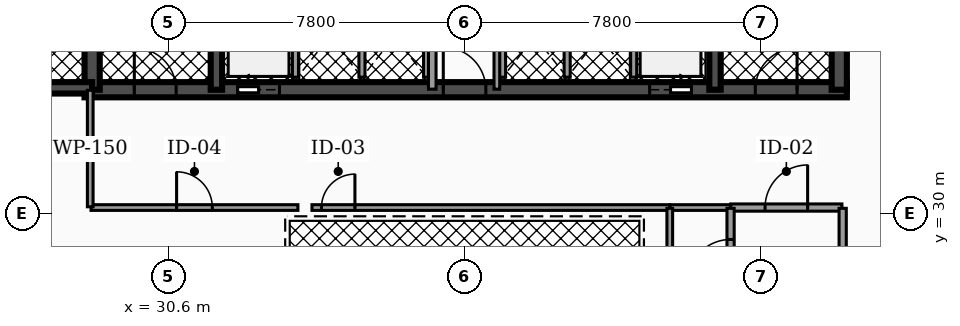
"""IFC4 building model, lengths in metres.
Left out: names, types, materials, properties, quantities, classifications, styles, units other than length and angle.
Written with IfcOpenShell. Run it as: python <this file> out.ifc"""

import sys

from ifc_helpers import new_model, si_unit, direction, frame, frame_2d, origin, place, context, subcontext, project, spatial, rectangle, extrude, element, fill, save


model = new_model("IFC4")
c1 = context("Model", 3, precision=1e-05, world=origin(), true_north=direction((0.0, 1.0)))
c2 = subcontext(c1, "Body", "Model", "MODEL_VIEW")
j1 = project(units=[si_unit("LENGTHUNIT", "METRE"), si_unit("PLANEANGLEUNIT", "RADIAN")], contexts=[c1])
p1 = place(None, origin())
s1 = spatial("IfcSite", under=j1, at=p1, CompositionType="ELEMENT")
p2 = place(p1, origin())
s2 = spatial("IfcBuilding", under=s1, at=p2, CompositionType="ELEMENT")
p3 = place(p2, frame((0.0, 0.0, 88.74)))
s3 = spatial("IfcBuildingStorey", under=s2, at=p3, CompositionType="ELEMENT", Elevation=88.74)
p4 = place(p3, frame((28.4, 33.25, 0.0), z_axis=(0.0, 0.0, 1.0), x_axis=(1.0, 0.0, 0.0)))
e1 = element("IfcWall", 1, at=p4, inside=s3, PredefinedType="SHEAR", context=c2, shape_type="SweptSolid", body=[
    extrude(rectangle(XDim=20.06, YDim=0.4, at=frame_2d((10.03, 0.0))), origin(), (0.0, 0.0, 1.0), 3.82),
])
p5 = place(p4, frame((4.03, 0.0, 0.0)))
e2 = element("IfcOpeningElement", 2, at=p5, cuts=e1, PredefinedType="OPENING", context=c2, shape_type="SweptSolid", body=[
    extrude(rectangle(XDim=1.1, YDim=2.15, at=frame_2d((0.55, 1.075))), frame((0.0, 0.21, 0.0), z_axis=(0.0, -1.0, 0.0), x_axis=(1.0, 0.0, 0.0)), (0.0, 0.0, 1.0), 0.42),
])
p6 = place(p4, frame((14.87, 0.0, 0.0)))
e3 = element("IfcOpeningElement", 3, at=p6, cuts=e1, PredefinedType="OPENING", context=c2, shape_type="SweptSolid", body=[
    extrude(rectangle(XDim=1.1, YDim=2.15, at=frame_2d((0.55, 1.075))), frame((0.0, 0.21, 0.0), z_axis=(0.0, -1.0, 0.0), x_axis=(1.0, 0.0, 0.0)), (0.0, 0.0, 1.0), 0.42),
])
p7 = place(p4, frame((1.31, 0.0, 0.0)))
e4 = element("IfcOpeningElement", 4, at=p7, cuts=e1, PredefinedType="OPENING", context=c2, shape_type="SweptSolid", body=[
    extrude(rectangle(XDim=1.1, YDim=2.2, at=frame_2d((0.55, 1.1))), frame((0.0, 0.21, 0.0), z_axis=(0.0, -1.0, 0.0), x_axis=(1.0, 0.0, 0.0)), (0.0, 0.0, 1.0), 0.42),
])
p8 = place(p4, frame((9.44, 0.0, 0.0)))
e5 = element("IfcOpeningElement", 5, at=p8, cuts=e1, PredefinedType="OPENING", context=c2, shape_type="SweptSolid", body=[
    extrude(rectangle(XDim=1.12, YDim=2.05, at=frame_2d((0.56, 1.025))), frame((0.0, 0.21, 0.0), z_axis=(0.0, -1.0, 0.0), x_axis=(1.0, 0.0, 0.0)), (0.0, 0.0, 1.0), 0.42),
])
p9 = place(p4, frame((17.65, 0.0, 0.0)))
e6 = element("IfcOpeningElement", 6, at=p9, cuts=e1, PredefinedType="OPENING", context=c2, shape_type="SweptSolid", body=[
    extrude(rectangle(XDim=1.1, YDim=2.2, at=frame_2d((0.55, 1.1))), frame((0.0, 0.21, 0.0), z_axis=(0.0, -1.0, 0.0), x_axis=(1.0, 0.0, 0.0)), (0.0, 0.0, 1.0), 0.42),
])
p10 = place(p3, frame((28.6, 33.25, 0.0), z_axis=(0.0, 0.0, 1.0), x_axis=(0.0, 1.0, 0.0)))
e7 = element("IfcWall", 7, at=p10, inside=s3, PredefinedType="SHEAR", context=c2, shape_type="SweptSolid", body=[
    extrude(rectangle(XDim=10.2, YDim=0.4, at=frame_2d((5.1, 0.0))), origin(), (0.0, 0.0, 1.0), 3.82),
])
for number, where, z_axis, x_axis in (
    (8, (31.87, 33.25, 0.0), (0.0, 0.0, 1.0), (0.0, 1.0, 0.0)),
    (9, (44.99, 33.25, 0.0), (0.0, 0.0, 1.0), (0.0, 1.0, 0.0)),
):
    element("IfcWall", number, at=place(p3, frame(where, z_axis=z_axis, x_axis=x_axis)), inside=s3, PredefinedType="SHEAR", context=c2, shape_type="SweptSolid", body=[
        extrude(rectangle(XDim=10.2, YDim=0.3, at=frame_2d((5.1, 0.0))), origin(), (0.0, 0.0, 1.0), 3.82),
    ])
p11 = place(p3, frame((48.26, 33.25, 0.0), z_axis=(0.0, 0.0, 1.0), x_axis=(0.0, 1.0, 0.0)))
e10 = element("IfcWall", 10, at=p11, inside=s3, PredefinedType="SHEAR", context=c2, shape_type="SweptSolid", body=[
    extrude(rectangle(XDim=10.2, YDim=0.4, at=frame_2d((5.1, 0.0))), origin(), (0.0, 0.0, 1.0), 3.82),
])
p12 = place(p3, frame((25.08, 33.3, 0.0), z_axis=(0.0, 0.0, 1.0), x_axis=(1.0, 0.0, 0.0)))
e11 = element("IfcWall", 11, at=p12, inside=s3, PredefinedType="SHEAR", context=c2, shape_type="SweptSolid", body=[
    extrude(rectangle(XDim=3.52, YDim=0.3, at=frame_2d((1.76, 0.0))), origin(), (0.0, 0.0, 1.0), 3.82),
])
p13 = place(p12, frame((1.335, 0.0, 0.0)))
e12 = element("IfcOpeningElement", 12, at=p13, cuts=e11, PredefinedType="OPENING", context=c2, shape_type="SweptSolid", body=[
    extrude(rectangle(XDim=0.95, YDim=2.2, at=frame_2d((0.475, 1.1))), frame((0.0, 0.16, 0.0), z_axis=(0.0, -1.0, 0.0), x_axis=(1.0, 0.0, 0.0)), (0.0, 0.0, 1.0), 0.32),
])
for number, where, z_axis, x_axis in (
    (13, (33.95, 33.58, 0.0), (0.0, 0.0, 1.0), (0.0, 1.0, 0.0)),
    (14, (42.85, 33.58, 0.0), (0.0, 0.0, 1.0), (0.0, 1.0, 0.0)),
):
    element("IfcWall", number, at=place(p3, frame(where, z_axis=z_axis, x_axis=x_axis)), inside=s3, PredefinedType="SOLIDWALL", context=c2, shape_type="SweptSolid", body=[
        extrude(rectangle(XDim=2.45, YDim=0.16, at=frame_2d((1.225, 0.0))), origin(), (0.0, 0.0, 1.0), 2.792),
    ])
for number, where, z_axis, x_axis in (
    (15, (35.7, 33.58, 0.0), (0.0, 0.0, 1.0), (0.0, 1.0, 0.0)),
    (16, (37.4, 33.58, 0.0), (0.0, 0.0, 1.0), (0.0, 1.0, 0.0)),
    (17, (39.4, 33.58, 0.0), (0.0, 0.0, 1.0), (0.0, 1.0, 0.0)),
    (18, (41.1, 33.58, 0.0), (0.0, 0.0, 1.0), (0.0, 1.0, 0.0)),
):
    element("IfcWall", number, at=place(p3, frame(where, z_axis=z_axis, x_axis=x_axis)), inside=s3, PredefinedType="SOLIDWALL", context=c2, shape_type="SweptSolid", body=[
        extrude(rectangle(XDim=2.25, YDim=0.16, at=frame_2d((1.125, 0.0))), origin(), (0.0, 0.0, 1.0), 2.792),
    ])
p14 = place(p3, frame((37.55, 33.265, 0.0), z_axis=(0.0, 0.0, 1.0), x_axis=(0.0, 1.0, 0.0)))
e19 = element("IfcWall", 19, at=p14, inside=s3, PredefinedType="PARTITIONING", context=c2, shape_type="SweptSolid", body=[
    extrude(rectangle(XDim=4.595, YDim=0.2, at=frame_2d((2.298, 0.0))), origin(), (0.0, 0.0, 1.0), 2.777),
])
p15 = place(p14, frame((3.058, 0.0, 0.0)))
e20 = element("IfcOpeningElement", 20, at=p15, cuts=e19, PredefinedType="OPENING", context=c2, shape_type="SweptSolid", body=[
    extrude(rectangle(XDim=0.88, YDim=2.05, at=frame_2d((0.44, 1.025))), frame((0.0, 0.11, 0.0), z_axis=(0.0, -1.0, 0.0), x_axis=(1.0, 0.0, 0.0)), (0.0, 0.0, 1.0), 0.22),
])
p16 = place(p3, frame((39.25, 33.265, 0.0), z_axis=(0.0, 0.0, 1.0), x_axis=(0.0, 1.0, 0.0)))
e21 = element("IfcWall", 21, at=p16, inside=s3, PredefinedType="PARTITIONING", context=c2, shape_type="SweptSolid", body=[
    extrude(rectangle(XDim=4.595, YDim=0.15, at=frame_2d((2.298, 0.0))), origin(), (0.0, 0.0, 1.0), 2.777),
])
p17 = place(p16, frame((3.028, 0.0, 0.0)))
e22 = element("IfcOpeningElement", 22, at=p17, cuts=e21, PredefinedType="OPENING", context=c2, shape_type="SweptSolid", body=[
    extrude(rectangle(XDim=0.94, YDim=2.05, at=frame_2d((0.47, 1.025))), frame((0.0, 0.085, 0.0), z_axis=(0.0, -1.0, 0.0), x_axis=(1.0, 0.0, 0.0)), (0.0, 0.0, 1.0), 0.17),
])
p18 = place(p3, frame((45.405, 30.15, 0.0), z_axis=(0.0, 0.0, 1.0), x_axis=(1.0, 0.0, 0.0)))
e23 = element("IfcWall", 23, at=p18, inside=s3, PredefinedType="PARTITIONING", context=c2, shape_type="SweptSolid", body=[
    extrude(rectangle(XDim=2.925, YDim=0.19, at=frame_2d((1.462, 0.0))), origin(), (0.0, 0.0, 1.0), 2.777),
])
p19 = place(p18, frame((0.903, 0.0, 0.0)))
e24 = element("IfcOpeningElement", 24, at=p19, cuts=e23, PredefinedType="OPENING", context=c2, shape_type="SweptSolid", body=[
    extrude(rectangle(XDim=1.12, YDim=2.05, at=frame_2d((0.56, 1.025))), frame((0.0, 0.105, 0.0), z_axis=(0.0, -1.0, 0.0), x_axis=(1.0, 0.0, 0.0)), (0.0, 0.0, 1.0), 0.21),
])
p20 = place(p3, frame((43.805, 30.15, 0.0), z_axis=(0.0, 0.0, 1.0), x_axis=(1.0, 0.0, 0.0)))
e25 = element("IfcWall", 25, at=p20, inside=s3, PredefinedType="PARTITIONING", context=c2, shape_type="SweptSolid", body=[
    extrude(rectangle(XDim=1.59, YDim=0.15, at=frame_2d((0.795, 0.0))), origin(), (0.0, 0.0, 1.0), 2.777),
])
p21 = place(p3, frame((28.57, 30.15, 0.0), z_axis=(0.0, 0.0, 1.0), x_axis=(1.0, 0.0, 0.0)))
e26 = element("IfcWall", 26, at=p21, inside=s3, PredefinedType="PARTITIONING", context=c2, shape_type="SweptSolid", body=[
    extrude(rectangle(XDim=5.445, YDim=0.15, at=frame_2d((2.722, 0.0))), origin(), (0.0, 0.0, 1.0), 2.777),
])
p22 = place(p21, frame((2.252, 0.0, 0.0)))
e27 = element("IfcOpeningElement", 27, at=p22, cuts=e26, PredefinedType="OPENING", context=c2, shape_type="SweptSolid", body=[
    extrude(rectangle(XDim=0.94, YDim=2.05, at=frame_2d((0.47, 1.025))), frame((0.0, 0.085, 0.0), z_axis=(0.0, -1.0, 0.0), x_axis=(1.0, 0.0, 0.0)), (0.0, 0.0, 1.0), 0.17),
])
p23 = place(p3, frame((28.55, 30.17, 0.0), z_axis=(0.0, 0.0, 1.0), x_axis=(0.0, 1.0, 0.0)))
e28 = element("IfcWall", 28, at=p23, inside=s3, PredefinedType="PARTITIONING", context=c2, shape_type="SweptSolid", body=[
    extrude(rectangle(XDim=3.065, YDim=0.15, at=frame_2d((1.533, 0.0))), origin(), (0.0, 0.0, 1.0), 2.777),
])
p24 = place(p3, frame((34.385, 30.15, 0.0), z_axis=(0.0, 0.0, 1.0), x_axis=(1.0, 0.0, 0.0)))
e29 = element("IfcWall", 29, at=p24, inside=s3, PredefinedType="PARTITIONING", context=c2, shape_type="SweptSolid", body=[
    extrude(rectangle(XDim=9.41, YDim=0.15, at=frame_2d((4.705, 0.0))), origin(), (0.0, 0.0, 1.0), 2.777),
])
p25 = place(p24, frame((0.25, 0.0, 0.0)))
e30 = element("IfcOpeningElement", 30, at=p25, cuts=e29, PredefinedType="OPENING", context=c2, shape_type="SweptSolid", body=[
    extrude(rectangle(XDim=0.88, YDim=2.05, at=frame_2d((0.44, 1.025))), frame((0.0, 0.085, 0.0), z_axis=(0.0, -1.0, 0.0), x_axis=(1.0, 0.0, 0.0)), (0.0, 0.0, 1.0), 0.17),
])
p26 = place(p3, frame((45.4, 27.37, 0.0), z_axis=(0.0, 0.0, 1.0), x_axis=(0.0, 1.0, 0.0)))
e31 = element("IfcWall", 31, at=p26, inside=s3, PredefinedType="PARTITIONING", context=c2, shape_type="SweptSolid", body=[
    extrude(rectangle(XDim=2.76, YDim=0.19, at=frame_2d((1.38, 0.0))), origin(), (0.0, 0.0, 1.0), 2.777),
])
p27 = place(p26, frame((0.82, 0.0, 0.0)))
e32 = element("IfcOpeningElement", 32, at=p27, cuts=e31, PredefinedType="OPENING", context=c2, shape_type="SweptSolid", body=[
    extrude(rectangle(XDim=1.12, YDim=2.05, at=frame_2d((0.56, 1.025))), frame((0.0, 0.105, 0.0), z_axis=(0.0, -1.0, 0.0), x_axis=(1.0, 0.0, 0.0)), (0.0, 0.0, 1.0), 0.21),
])
p28 = place(p3, frame((48.35, 27.37, 0.0), z_axis=(0.0, 0.0, 1.0), x_axis=(0.0, 1.0, 0.0)))
e33 = element("IfcWall", 33, at=p28, inside=s3, PredefinedType="PARTITIONING", context=c2, shape_type="SweptSolid", body=[
    extrude(rectangle(XDim=2.76, YDim=0.19, at=frame_2d((1.38, 0.0))), origin(), (0.0, 0.0, 1.0), 2.777),
])
p29 = place(p3, frame((43.8, 23.62, 0.0), z_axis=(0.0, 0.0, 1.0), x_axis=(0.0, 1.0, 0.0)))
e34 = element("IfcWall", 34, at=p29, inside=s3, PredefinedType="PARTITIONING", context=c2, shape_type="SweptSolid", body=[
    extrude(rectangle(XDim=6.51, YDim=0.15, at=frame_2d((3.255, 0.0))), origin(), (0.0, 0.0, 1.0), 2.777),
])
p30 = place(p5, origin())
e35 = element("IfcDoor", 35, at=p30, inside=s3, OperationType="SLIDING_TO_LEFT", PredefinedType="DOOR", context=c2, shape_type="SweptSolid", body=[
    extrude(rectangle(XDim=1.1, YDim=2.15, at=frame_2d((0.55, 1.075))), frame((0.0, 0.025, 0.0), z_axis=(0.0, -1.0, 0.0), x_axis=(1.0, 0.0, 0.0)), (0.0, 0.0, 1.0), 0.05),
])
fill(e2, e35)
p31 = place(p6, origin())
e36 = element("IfcDoor", 36, at=p31, inside=s3, OperationType="SLIDING_TO_RIGHT", PredefinedType="DOOR", context=c2, shape_type="SweptSolid", body=[
    extrude(rectangle(XDim=1.1, YDim=2.15, at=frame_2d((0.55, 1.075))), frame((0.0, 0.025, 0.0), z_axis=(0.0, -1.0, 0.0), x_axis=(1.0, 0.0, 0.0)), (0.0, 0.0, 1.0), 0.05),
])
fill(e3, e36)
p32 = place(p7, origin())
e37 = element("IfcDoor", 37, at=p32, inside=s3, OperationType="SINGLE_SWING_LEFT", PredefinedType="DOOR", context=c2, shape_type="SweptSolid", body=[
    extrude(rectangle(XDim=1.1, YDim=2.2, at=frame_2d((0.55, 1.1))), frame((0.0, 0.025, 0.0), z_axis=(0.0, -1.0, 0.0), x_axis=(1.0, 0.0, 0.0)), (0.0, 0.0, 1.0), 0.05),
])
fill(e4, e37)
p33 = place(p8, origin())
e38 = element("IfcDoor", 38, at=p33, inside=s3, OperationType="SINGLE_SWING_LEFT", PredefinedType="DOOR", context=c2, shape_type="SweptSolid", body=[
    extrude(rectangle(XDim=1.12, YDim=2.05, at=frame_2d((0.56, 1.025))), frame((0.0, 0.025, 0.0), z_axis=(0.0, -1.0, 0.0), x_axis=(1.0, 0.0, 0.0)), (0.0, 0.0, 1.0), 0.05),
])
fill(e5, e38)
p34 = place(p9, origin())
e39 = element("IfcDoor", 39, at=p34, inside=s3, OperationType="SINGLE_SWING_RIGHT", PredefinedType="DOOR", context=c2, shape_type="SweptSolid", body=[
    extrude(rectangle(XDim=1.1, YDim=2.2, at=frame_2d((0.55, 1.1))), frame((0.0, 0.025, 0.0), z_axis=(0.0, -1.0, 0.0), x_axis=(1.0, 0.0, 0.0)), (0.0, 0.0, 1.0), 0.05),
])
fill(e6, e39)
p35 = place(p19, origin())
e40 = element("IfcDoor", 40, at=p35, inside=s3, OperationType="SINGLE_SWING_RIGHT", PredefinedType="DOOR", context=c2, shape_type="SweptSolid", body=[
    extrude(rectangle(XDim=1.12, YDim=2.05, at=frame_2d((0.56, 1.025))), frame((0.0, 0.025, 0.0), z_axis=(0.0, -1.0, 0.0), x_axis=(1.0, 0.0, 0.0)), (0.0, 0.0, 1.0), 0.05),
])
fill(e24, e40)
p36 = place(p22, origin())
e41 = element("IfcDoor", 41, at=p36, inside=s3, OperationType="SINGLE_SWING_LEFT", PredefinedType="DOOR", context=c2, shape_type="SweptSolid", body=[
    extrude(rectangle(XDim=0.94, YDim=2.05, at=frame_2d((0.47, 1.025))), frame((0.0, 0.025, 0.0), z_axis=(0.0, -1.0, 0.0), x_axis=(1.0, 0.0, 0.0)), (0.0, 0.0, 1.0), 0.05),
])
fill(e27, e41)
p37 = place(p25, origin())
e42 = element("IfcDoor", 42, at=p37, inside=s3, OperationType="SINGLE_SWING_RIGHT", PredefinedType="DOOR", context=c2, shape_type="SweptSolid", body=[
    extrude(rectangle(XDim=0.88, YDim=2.05, at=frame_2d((0.44, 1.025))), frame((0.0, 0.025, 0.0), z_axis=(0.0, -1.0, 0.0), x_axis=(1.0, 0.0, 0.0)), (0.0, 0.0, 1.0), 0.05),
])
fill(e30, e42)
p38 = place(p27, origin())
e43 = element("IfcDoor", 43, at=p38, inside=s3, OperationType="SINGLE_SWING_LEFT", PredefinedType="DOOR", context=c2, shape_type="SweptSolid", body=[
    extrude(rectangle(XDim=1.12, YDim=2.05, at=frame_2d((0.56, 1.025))), frame((0.0, 0.025, 0.0), z_axis=(0.0, -1.0, 0.0), x_axis=(1.0, 0.0, 0.0)), (0.0, 0.0, 1.0), 0.05),
])
fill(e32, e43)
save(model, sys.argv[1])
